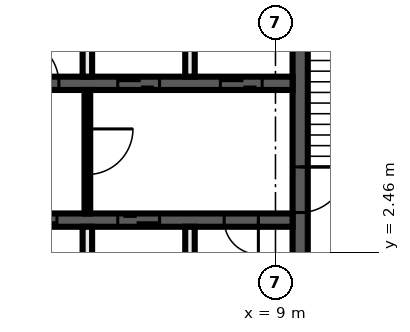
"""IFC4 building model, lengths in metres.
Left out: names, types, materials, properties, quantities, classifications, styles, units other than length and angle.
Written with IfcOpenShell. Run it as: python <this file> out.ifc"""

import sys

from ifc_helpers import new_model, si_unit, direction, frame, frame_2d, origin, place, context, subcontext, project, spatial, rectangle, extrude, element, fill, save


model = new_model("IFC4")
c1 = context("Model", 3, precision=1e-05, world=origin(), true_north=direction((0.0, 1.0)))
c2 = subcontext(c1, "Body", "Model", "MODEL_VIEW")
j1 = project(units=[si_unit("LENGTHUNIT", "METRE"), si_unit("PLANEANGLEUNIT", "RADIAN")], contexts=[c1])
p1 = place(None, origin())
s1 = spatial("IfcSite", under=j1, at=p1, CompositionType="ELEMENT")
p2 = place(p1, origin())
s2 = spatial("IfcBuilding", under=s1, at=p2, CompositionType="ELEMENT")
p3 = place(p2, frame((0.0, 0.0, 266.4)))
s3 = spatial("IfcBuildingStorey", under=s2, at=p3, CompositionType="ELEMENT", Elevation=266.4)
p4 = place(p3, frame((9.65, 9.8, 0.0), z_axis=(0.0, 0.0, 1.0), x_axis=(0.0, -1.0, 0.0)))
e1 = element("IfcWall", 1, at=p4, inside=s3, PredefinedType="SHEAR", context=c2, shape_type="SweptSolid", body=[
    extrude(rectangle(XDim=7.5, YDim=0.4, at=frame_2d((3.75, 0.0))), origin(), (0.0, 0.0, 1.0), 3.82),
])
p5 = place(p4, frame((5.1, 0.0, 0.0)))
e2 = element("IfcOpeningElement", 2, at=p5, cuts=e1, PredefinedType="OPENING", context=c2, shape_type="SweptSolid", body=[
    extrude(rectangle(XDim=1.2, YDim=2.1, at=frame_2d((0.6, 1.05))), frame((0.0, 0.21, 0.0), z_axis=(0.0, -1.0, 0.0), x_axis=(1.0, 0.0, 0.0)), (0.0, 0.0, 1.0), 0.42),
])
p6 = place(p3, frame((-9.45, 6.9, 0.0), z_axis=(0.0, 0.0, 1.0), x_axis=(1.0, 0.0, 0.0)))
e3 = element("IfcWall", 3, at=p6, inside=s3, PredefinedType="SHEAR", context=c2, shape_type="SweptSolid", body=[
    extrude(rectangle(XDim=18.9, YDim=0.35, at=frame_2d((9.45, 0.0))), origin(), (0.0, 0.0, 1.0), 3.82),
])
p7 = place(p6, frame((11.55, 0.0, 0.0)))
e4 = element("IfcOpeningElement", 4, at=p7, cuts=e3, PredefinedType="OPENING", context=c2, shape_type="SweptSolid", body=[
    extrude(rectangle(XDim=1.2, YDim=2.1, at=frame_2d((0.6, 1.05))), frame((0.0, 0.185, 0.0), z_axis=(0.0, -1.0, 0.0), x_axis=(1.0, 0.0, 0.0)), (0.0, 0.0, 1.0), 0.37),
])
p8 = place(p6, frame((14.3, 0.0, 0.0)))
e5 = element("IfcOpeningElement", 5, at=p8, cuts=e3, PredefinedType="OPENING", context=c2, shape_type="SweptSolid", body=[
    extrude(rectangle(XDim=1.1, YDim=2.1, at=frame_2d((0.55, 1.05))), frame((0.0, 0.185, 0.0), z_axis=(0.0, -1.0, 0.0), x_axis=(1.0, 0.0, 0.0)), (0.0, 0.0, 1.0), 0.37),
])
p9 = place(p6, frame((17.0, 0.0, 0.0)))
e6 = element("IfcOpeningElement", 6, at=p9, cuts=e3, PredefinedType="OPENING", context=c2, shape_type="SweptSolid", body=[
    extrude(rectangle(XDim=1.1, YDim=2.1, at=frame_2d((0.55, 1.05))), frame((0.0, 0.185, 0.0), z_axis=(0.0, -1.0, 0.0), x_axis=(1.0, 0.0, 0.0)), (0.0, 0.0, 1.0), 0.37),
])
p10 = place(p6, frame((2.25, 0.0, 0.0)))
e7 = element("IfcOpeningElement", 7, at=p10, cuts=e3, PredefinedType="OPENING", context=c2, shape_type="SweptSolid", body=[
    extrude(rectangle(XDim=0.9, YDim=2.1, at=frame_2d((0.45, 1.05))), frame((0.0, 0.185, 0.0), z_axis=(0.0, -1.0, 0.0), x_axis=(1.0, 0.0, 0.0)), (0.0, 0.0, 1.0), 0.37),
])
p11 = place(p6, frame((7.65, 0.0, 0.0)))
e8 = element("IfcOpeningElement", 8, at=p11, cuts=e3, PredefinedType="OPENING", context=c2, shape_type="SweptSolid", body=[
    extrude(rectangle(XDim=0.9, YDim=2.1, at=frame_2d((0.45, 1.05))), frame((0.0, 0.185, 0.0), z_axis=(0.0, -1.0, 0.0), x_axis=(1.0, 0.0, 0.0)), (0.0, 0.0, 1.0), 0.37),
])
p12 = place(p3, frame((9.45, 3.3, 0.0), z_axis=(0.0, 0.0, 1.0), x_axis=(-1.0, 0.0, 0.0)))
e9 = element("IfcWall", 9, at=p12, inside=s3, PredefinedType="SHEAR", context=c2, shape_type="SweptSolid", body=[
    extrude(rectangle(XDim=18.9, YDim=0.35, at=frame_2d((9.45, 0.0))), origin(), (0.0, 0.0, 1.0), 3.82),
])
p13 = place(p12, frame((6.2, 0.0, 0.0)))
e10 = element("IfcOpeningElement", 10, at=p13, cuts=e9, PredefinedType="OPENING", context=c2, shape_type="SweptSolid", body=[
    extrude(rectangle(XDim=1.1, YDim=2.1, at=frame_2d((0.55, 1.05))), frame((0.0, 0.185, 0.0), z_axis=(0.0, -1.0, 0.0), x_axis=(1.0, 0.0, 0.0)), (0.0, 0.0, 1.0), 0.37),
])
p14 = place(p12, frame((3.5, 0.0, 0.0)))
e11 = element("IfcOpeningElement", 11, at=p14, cuts=e9, PredefinedType="OPENING", context=c2, shape_type="SweptSolid", body=[
    extrude(rectangle(XDim=1.1, YDim=2.1, at=frame_2d((0.55, 1.05))), frame((0.0, 0.185, 0.0), z_axis=(0.0, -1.0, 0.0), x_axis=(1.0, 0.0, 0.0)), (0.0, 0.0, 1.0), 0.37),
])
p15 = place(p12, frame((0.9, 0.0, 0.0)))
e12 = element("IfcOpeningElement", 12, at=p15, cuts=e9, PredefinedType="OPENING", context=c2, shape_type="SweptSolid", body=[
    extrude(rectangle(XDim=0.9, YDim=2.1, at=frame_2d((0.45, 1.05))), frame((0.0, 0.185, 0.0), z_axis=(0.0, -1.0, 0.0), x_axis=(1.0, 0.0, 0.0)), (0.0, 0.0, 1.0), 0.37),
])
p16 = place(p12, frame((17.1, 0.0, 0.0)))
e13 = element("IfcOpeningElement", 13, at=p16, cuts=e9, PredefinedType="OPENING", context=c2, shape_type="SweptSolid", body=[
    extrude(rectangle(XDim=0.9, YDim=2.1, at=frame_2d((0.45, 1.05))), frame((0.0, 0.185, 0.0), z_axis=(0.0, -1.0, 0.0), x_axis=(1.0, 0.0, 0.0)), (0.0, 0.0, 1.0), 0.37),
])
p17 = place(p12, frame((14.4, 0.0, 0.0)))
e14 = element("IfcOpeningElement", 14, at=p17, cuts=e9, PredefinedType="OPENING", context=c2, shape_type="SweptSolid", body=[
    extrude(rectangle(XDim=0.9, YDim=2.1, at=frame_2d((0.45, 1.05))), frame((0.0, 0.185, 0.0), z_axis=(0.0, -1.0, 0.0), x_axis=(1.0, 0.0, 0.0)), (0.0, 0.0, 1.0), 0.37),
])
p18 = place(p12, frame((11.7, 0.0, 0.0)))
e15 = element("IfcOpeningElement", 15, at=p18, cuts=e9, PredefinedType="OPENING", context=c2, shape_type="SweptSolid", body=[
    extrude(rectangle(XDim=0.9, YDim=2.1, at=frame_2d((0.45, 1.05))), frame((0.0, 0.185, 0.0), z_axis=(0.0, -1.0, 0.0), x_axis=(1.0, 0.0, 0.0)), (0.0, 0.0, 1.0), 0.37),
])
p19 = place(p12, frame((9.0, 0.0, 0.0)))
e16 = element("IfcOpeningElement", 16, at=p19, cuts=e9, PredefinedType="OPENING", context=c2, shape_type="SweptSolid", body=[
    extrude(rectangle(XDim=0.9, YDim=2.1, at=frame_2d((0.45, 1.05))), frame((0.0, 0.185, 0.0), z_axis=(0.0, -1.0, 0.0), x_axis=(1.0, 0.0, 0.0)), (0.0, 0.0, 1.0), 0.37),
])
for number, where, z_axis, x_axis in (
    (17, (6.75, 0.4, 0.0), (0.0, 0.0, 1.0), (0.0, 1.0, 0.0)),
    (18, (6.75, 7.075, 0.0), (0.0, 0.0, 1.0), (0.0, 1.0, 0.0)),
):
    element("IfcWall", number, at=place(p3, frame(where, z_axis=z_axis, x_axis=x_axis)), inside=s3, PredefinedType="SOLIDWALL", context=c2, shape_type="SweptSolid", body=[
        extrude(rectangle(XDim=2.725, YDim=0.25, at=frame_2d((1.363, 0.0))), origin(), (0.0, 0.0, 1.0), 3.82),
    ])
p20 = place(p3, frame((4.05, 6.725, 0.0), z_axis=(0.0, 0.0, 1.0), x_axis=(0.0, -1.0, 0.0)))
e19 = element("IfcWall", 19, at=p20, inside=s3, PredefinedType="PARTITIONING", context=c2, shape_type="SweptSolid", body=[
    extrude(rectangle(XDim=3.25, YDim=0.15, at=frame_2d((1.625, 0.0))), origin(), (0.0, 0.0, 1.0), 3.82),
])
p21 = place(p20, frame((1.025, 0.0, 0.0)))
e20 = element("IfcOpeningElement", 20, at=p21, cuts=e19, PredefinedType="OPENING", context=c2, shape_type="SweptSolid", body=[
    extrude(rectangle(XDim=1.2, YDim=2.1, at=frame_2d((0.6, 1.05))), frame((0.0, 0.085, 0.0), z_axis=(0.0, -1.0, 0.0), x_axis=(1.0, 0.0, 0.0)), (0.0, 0.0, 1.0), 0.17),
])
for number, where, z_axis, x_axis in (
    (21, (4.05, 0.4, 0.0), (0.0, 0.0, 1.0), (0.0, 1.0, 0.0)),
    (22, (4.05, 7.075, 0.0), (0.0, 0.0, 1.0), (0.0, 1.0, 0.0)),
):
    element("IfcWall", number, at=place(p3, frame(where, z_axis=z_axis, x_axis=x_axis)), inside=s3, PredefinedType="SOLIDWALL", context=c2, shape_type="SweptSolid", body=[
        extrude(rectangle(XDim=2.725, YDim=0.25, at=frame_2d((1.363, 0.0))), origin(), (0.0, 0.0, 1.0), 3.82),
    ])
p22 = place(p7, origin())
e23 = element("IfcDoor", 23, at=p22, inside=s3, OperationType="SINGLE_SWING_LEFT", PredefinedType="DOOR", context=c2, shape_type="SweptSolid", body=[
    extrude(rectangle(XDim=1.2, YDim=2.1, at=frame_2d((0.6, 1.05))), frame((0.0, 0.025, 0.0), z_axis=(0.0, -1.0, 0.0), x_axis=(1.0, 0.0, 0.0)), (0.0, 0.0, 1.0), 0.05),
])
fill(e4, e23)
p23 = place(p8, origin())
e24 = element("IfcDoor", 24, at=p23, inside=s3, OperationType="DOUBLE_DOOR_SLIDING", PredefinedType="DOOR", context=c2, shape_type="SweptSolid", body=[
    extrude(rectangle(XDim=1.1, YDim=2.1, at=frame_2d((0.55, 1.05))), frame((0.0, 0.025, 0.0), z_axis=(0.0, -1.0, 0.0), x_axis=(1.0, 0.0, 0.0)), (0.0, 0.0, 1.0), 0.05),
])
fill(e5, e24)
p24 = place(p9, origin())
e25 = element("IfcDoor", 25, at=p24, inside=s3, OperationType="DOUBLE_DOOR_SLIDING", PredefinedType="DOOR", context=c2, shape_type="SweptSolid", body=[
    extrude(rectangle(XDim=1.1, YDim=2.1, at=frame_2d((0.55, 1.05))), frame((0.0, 0.025, 0.0), z_axis=(0.0, -1.0, 0.0), x_axis=(1.0, 0.0, 0.0)), (0.0, 0.0, 1.0), 0.05),
])
fill(e6, e25)
p25 = place(p13, origin())
e26 = element("IfcDoor", 26, at=p25, inside=s3, OperationType="DOUBLE_DOOR_SLIDING", PredefinedType="DOOR", context=c2, shape_type="SweptSolid", body=[
    extrude(rectangle(XDim=1.1, YDim=2.1, at=frame_2d((0.55, 1.05))), frame((0.0, 0.025, 0.0), z_axis=(0.0, -1.0, 0.0), x_axis=(1.0, 0.0, 0.0)), (0.0, 0.0, 1.0), 0.05),
])
fill(e10, e26)
p26 = place(p14, origin())
e27 = element("IfcDoor", 27, at=p26, inside=s3, OperationType="DOUBLE_DOOR_SLIDING", PredefinedType="DOOR", context=c2, shape_type="SweptSolid", body=[
    extrude(rectangle(XDim=1.1, YDim=2.1, at=frame_2d((0.55, 1.05))), frame((0.0, 0.025, 0.0), z_axis=(0.0, -1.0, 0.0), x_axis=(1.0, 0.0, 0.0)), (0.0, 0.0, 1.0), 0.05),
])
fill(e11, e27)
p27 = place(p15, origin())
e28 = element("IfcDoor", 28, at=p27, inside=s3, OperationType="SINGLE_SWING_LEFT", PredefinedType="DOOR", context=c2, shape_type="SweptSolid", body=[
    extrude(rectangle(XDim=0.9, YDim=2.1, at=frame_2d((0.45, 1.05))), frame((0.0, 0.025, 0.0), z_axis=(0.0, -1.0, 0.0), x_axis=(1.0, 0.0, 0.0)), (0.0, 0.0, 1.0), 0.05),
])
fill(e12, e28)
p28 = place(p5, origin())
e29 = element("IfcDoor", 29, at=p28, inside=s3, OperationType="SINGLE_SWING_LEFT", PredefinedType="DOOR", context=c2, shape_type="SweptSolid", body=[
    extrude(rectangle(XDim=1.2, YDim=2.1, at=frame_2d((0.6, 1.05))), frame((0.0, 0.025, 0.0), z_axis=(0.0, -1.0, 0.0), x_axis=(1.0, 0.0, 0.0)), (0.0, 0.0, 1.0), 0.05),
])
fill(e2, e29)
p29 = place(p21, origin())
e30 = element("IfcDoor", 30, at=p29, inside=s3, OperationType="SINGLE_SWING_RIGHT", PredefinedType="DOOR", context=c2, shape_type="SweptSolid", body=[
    extrude(rectangle(XDim=1.2, YDim=2.1, at=frame_2d((0.6, 1.05))), frame((0.0, 0.025, 0.0), z_axis=(0.0, -1.0, 0.0), x_axis=(1.0, 0.0, 0.0)), (0.0, 0.0, 1.0), 0.05),
])
fill(e20, e30)
save(model, sys.argv[1])
